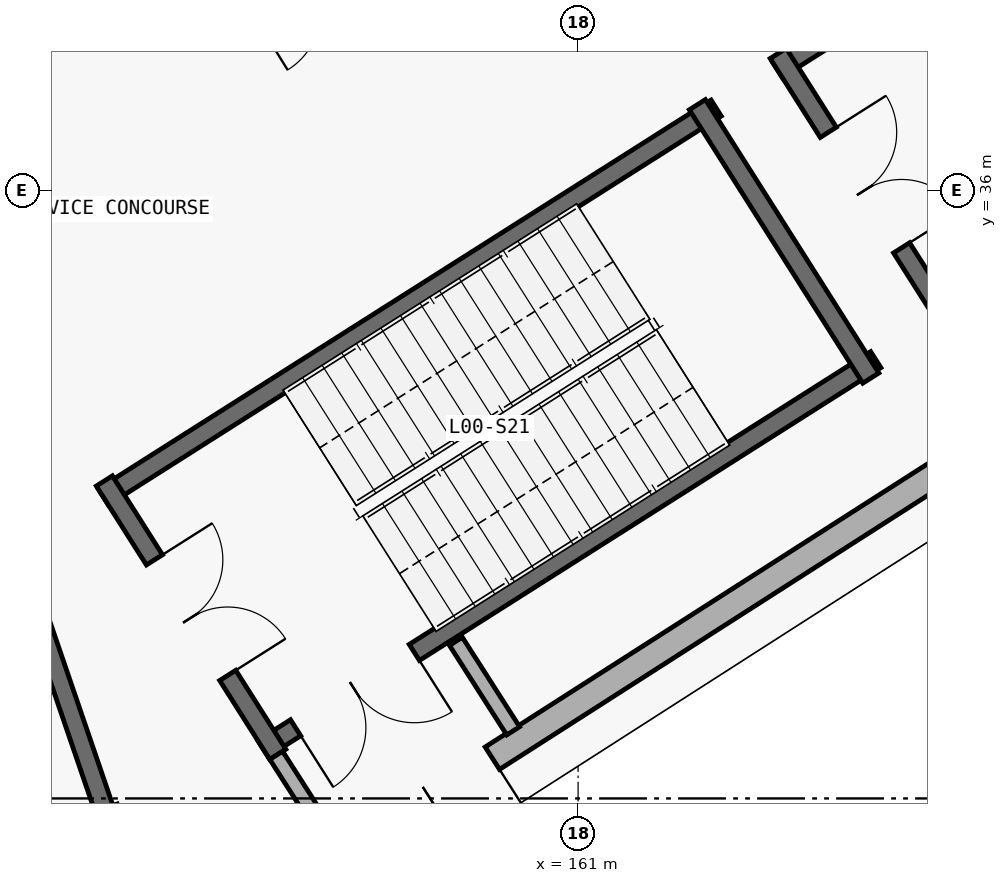
"""IFC4 building model, lengths in metres.
Left out: names, types, materials, properties, quantities, classifications, styles, units other than length and angle.
Written with IfcOpenShell. Run it as: python <this file> out.ifc"""

import sys

from ifc_helpers import new_model, si_unit, direction, frame, frame_2d, origin, place, context, subcontext, project, spatial, rectangle, extrude, element, fill, save


model = new_model("IFC4")
c1 = context("Model", 3, precision=1e-05, world=origin(), true_north=direction((0.0, 1.0)))
c2 = subcontext(c1, "Body", "Model", "MODEL_VIEW")
j1 = project(units=[si_unit("LENGTHUNIT", "METRE"), si_unit("PLANEANGLEUNIT", "RADIAN")], contexts=[c1])
p1 = place(None, origin())
s1 = spatial("IfcSite", under=j1, at=p1, CompositionType="ELEMENT")
p2 = place(p1, origin())
s2 = spatial("IfcBuilding", under=s1, at=p2, CompositionType="ELEMENT")
p3 = place(p2, origin())
s3 = spatial("IfcBuildingStorey", under=s2, at=p3, CompositionType="ELEMENT", Elevation=0.0)
p4 = place(p3, frame((175.399, 38.465, 0.0), z_axis=(0.0, 0.0, 1.0), x_axis=(-0.842308733224, -0.538995359845, 0.0)))
e1 = element("IfcWall", 1, at=p4, inside=s3, PredefinedType="STANDARD", context=c2, shape_type="SweptSolid", body=[
    extrude(rectangle(XDim=21.139, YDim=0.35, at=frame_2d((10.57, 0.0))), origin(), (0.0, 0.0, 1.0), 4.165),
])
p5 = place(p4, frame((18.434, 0.0, 0.0)))
e2 = element("IfcOpeningElement", 2, at=p5, cuts=e1, PredefinedType="OPENING", context=c2, shape_type="SweptSolid", body=[
    extrude(rectangle(XDim=1.95, YDim=2.25, at=frame_2d((0.975, 1.125))), frame((0.0, 0.185, 0.0), z_axis=(0.0, -1.0, 0.0), x_axis=(1.0, 0.0, 0.0)), (0.0, 0.0, 1.0), 0.37),
])
p6 = place(p4, frame((7.935, 0.0, 0.0)))
e3 = element("IfcOpeningElement", 3, at=p6, cuts=e1, PredefinedType="OPENING", context=c2, shape_type="SweptSolid", body=[
    extrude(rectangle(XDim=1.95, YDim=2.25, at=frame_2d((0.975, 1.125))), frame((0.0, 0.185, 0.0), z_axis=(0.0, -1.0, 0.0), x_axis=(1.0, 0.0, 0.0)), (0.0, 0.0, 1.0), 0.37),
])
p7 = place(p4, frame((4.098, 0.0, 0.0)))
e4 = element("IfcOpeningElement", 4, at=p7, cuts=e1, PredefinedType="OPENING", context=c2, shape_type="SweptSolid", body=[
    extrude(rectangle(XDim=1.95, YDim=2.25, at=frame_2d((0.975, 1.125))), frame((0.0, 0.185, 0.0), z_axis=(0.0, -1.0, 0.0), x_axis=(1.0, 0.0, 0.0)), (0.0, 0.0, 1.0), 0.37),
])
p8 = place(p3, frame((164.917, 33.773, 0.0), z_axis=(0.0, 0.0, 1.0), x_axis=(-0.844391246241, -0.535727004427, 0.0)))
e5 = element("IfcWall", 5, at=p8, inside=s3, PredefinedType="SHEAR", context=c2, shape_type="SweptSolid", body=[
    extrude(rectangle(XDim=9.55, YDim=0.25, at=frame_2d((4.775, 0.0))), origin(), (0.0, 0.0, 1.0), 5.1),
])
p9 = place(p8, frame((7.19, 0.0, 0.0)))
e6 = element("IfcOpeningElement", 6, at=p9, cuts=e5, PredefinedType="OPENING", context=c2, shape_type="SweptSolid", body=[
    extrude(rectangle(XDim=1.85, YDim=2.3, at=frame_2d((0.925, 1.15))), frame((0.0, 0.135, 0.0), z_axis=(0.0, -1.0, 0.0), x_axis=(1.0, 0.0, 0.0)), (0.0, 0.0, 1.0), 0.27),
])
p10 = place(p3, frame((162.817, 37.083, 0.0), z_axis=(0.0, 0.0, 1.0), x_axis=(-0.844391246241, -0.535727004427, 0.0)))
e7 = element("IfcWall", 7, at=p10, inside=s3, PredefinedType="SHEAR", context=c2, shape_type="SweptSolid", body=[
    extrude(rectangle(XDim=9.55, YDim=0.25, at=frame_2d((4.775, 0.0))), origin(), (0.0, 0.0, 1.0), 5.1),
])
p11 = place(p3, frame((154.767, 32.177, 0.0), z_axis=(0.0, 0.0, 1.0), x_axis=(0.535684577572, -0.844418162613, 0.0)))
e8 = element("IfcWall", 8, at=p11, inside=s3, PredefinedType="SHEAR", context=c2, shape_type="SweptSolid", body=[
    extrude(rectangle(XDim=4.26, YDim=0.25, at=frame_2d((2.13, 0.0))), origin(), (0.0, 0.0, 1.0), 5.1),
])
p12 = place(p11, frame((1.23, 0.0, 0.0)))
e9 = element("IfcOpeningElement", 9, at=p12, cuts=e8, PredefinedType="OPENING", context=c2, shape_type="SweptSolid", body=[
    extrude(rectangle(XDim=1.8, YDim=2.25, at=frame_2d((0.9, 1.125))), frame((0.0, 0.135, 0.0), z_axis=(0.0, -1.0, 0.0), x_axis=(1.0, 0.0, 0.0)), (0.0, 0.0, 1.0), 0.27),
])
p13 = place(p3, frame((164.852, 33.53, 0.0), z_axis=(0.0, 0.0, 1.0), x_axis=(-0.53572544074, 0.844392238325, 0.0)))
e10 = element("IfcWall", 10, at=p13, inside=s3, PredefinedType="SHEAR", context=c2, shape_type="SweptSolid", body=[
    extrude(rectangle(XDim=4.26, YDim=0.25, at=frame_2d((2.13, 0.0))), origin(), (0.0, 0.0, 1.0), 5.1),
])
p14 = place(p3, frame((154.976, 27.809, 0.0), z_axis=(0.0, 0.0, 1.0), x_axis=(-0.946064424228, -0.323978556712, 0.0)))
e11 = element("IfcWall", 11, at=p14, inside=s3, PredefinedType="SHEAR", context=c2, shape_type="SweptSolid", body=[
    extrude(rectangle(XDim=9.55, YDim=0.25, at=frame_2d((4.775, 0.0))), origin(), (0.0, 0.0, 1.0), 5.1),
])
p15 = place(p14, frame((7.19, 0.0, 0.0)))
e12 = element("IfcOpeningElement", 12, at=p15, cuts=e11, PredefinedType="OPENING", context=c2, shape_type="SweptSolid", body=[
    extrude(rectangle(XDim=1.85, YDim=2.3, at=frame_2d((0.925, 1.15))), frame((0.0, 0.135, 0.0), z_axis=(0.0, -1.0, 0.0), x_axis=(1.0, 0.0, 0.0)), (0.0, 0.0, 1.0), 0.27),
])
p16 = place(p3, frame((154.856, 27.589, 0.0), z_axis=(0.0, 0.0, 1.0), x_axis=(-0.323988758717, 0.946060930504, 0.0)))
e13 = element("IfcWall", 13, at=p16, inside=s3, PredefinedType="SHEAR", context=c2, shape_type="SweptSolid", body=[
    extrude(rectangle(XDim=4.26, YDim=0.25, at=frame_2d((2.13, 0.0))), origin(), (0.0, 0.0, 1.0), 5.1),
])
p17 = place(p3, frame((171.683, 42.708, 0.0), z_axis=(0.0, 0.0, 1.0), x_axis=(-0.844391246241, -0.535727004427, 0.0)))
e14 = element("IfcWall", 14, at=p17, inside=s3, PredefinedType="SHEAR", context=c2, shape_type="SweptSolid", body=[
    extrude(rectangle(XDim=9.55, YDim=0.25, at=frame_2d((4.775, 0.0))), origin(), (0.0, 0.0, 1.0), 5.1),
])
p18 = place(p3, frame((163.633, 37.802, 0.0), z_axis=(0.0, 0.0, 1.0), x_axis=(0.535684577572, -0.844418162613, 0.0)))
e15 = element("IfcWall", 15, at=p18, inside=s3, PredefinedType="SHEAR", context=c2, shape_type="SweptSolid", body=[
    extrude(rectangle(XDim=4.26, YDim=0.25, at=frame_2d((2.13, 0.0))), origin(), (0.0, 0.0, 1.0), 5.1),
])
p19 = place(p18, frame((1.23, 0.0, 0.0)))
e16 = element("IfcOpeningElement", 16, at=p19, cuts=e15, PredefinedType="OPENING", context=c2, shape_type="SweptSolid", body=[
    extrude(rectangle(XDim=1.8, YDim=2.25, at=frame_2d((0.9, 1.125))), frame((0.0, 0.135, 0.0), z_axis=(0.0, -1.0, 0.0), x_axis=(1.0, 0.0, 0.0)), (0.0, 0.0, 1.0), 0.27),
])
p20 = place(p3, frame((157.028, 28.567, 0.0), z_axis=(0.0, 0.0, 1.0), x_axis=(0.539171685924, -0.842195875731, 0.0)))
e17 = element("IfcWall", 17, at=p20, inside=s3, PredefinedType="PARTITIONING", context=c2, shape_type="SweptSolid", body=[
    extrude(rectangle(XDim=1.409, YDim=0.2, at=frame_2d((0.705, 0.0))), origin(), (0.0, 0.0, 1.0), 4.165),
])
p21 = place(p3, frame((159.393, 30.067, 0.0), z_axis=(0.0, 0.0, 1.0), x_axis=(0.538885207577, -0.842379209771, 0.0)))
e18 = element("IfcWall", 18, at=p21, inside=s3, PredefinedType="PARTITIONING", context=c2, shape_type="SweptSolid", body=[
    extrude(rectangle(XDim=1.398, YDim=0.2, at=frame_2d((0.699, 0.0))), origin(), (0.0, 0.0, 1.0), 4.165),
])
p22 = place(p5, origin())
e19 = element("IfcDoor", 19, at=p22, inside=s3, OperationType="DOUBLE_DOOR_SINGLE_SWING", PredefinedType="DOOR", context=c2, shape_type="SweptSolid", body=[
    extrude(rectangle(XDim=1.95, YDim=2.25, at=frame_2d((0.975, 1.125))), frame((0.0, 0.025, 0.0), z_axis=(0.0, -1.0, 0.0), x_axis=(1.0, 0.0, 0.0)), (0.0, 0.0, 1.0), 0.05),
])
fill(e2, e19)
p23 = place(p12, origin())
e20 = element("IfcDoor", 20, at=p23, inside=s3, OperationType="DOUBLE_DOOR_SINGLE_SWING", PredefinedType="DOOR", context=c2, shape_type="SweptSolid", body=[
    extrude(rectangle(XDim=1.8, YDim=2.25, at=frame_2d((0.9, 1.125))), frame((0.0, 0.025, 0.0), z_axis=(0.0, -1.0, 0.0), x_axis=(1.0, 0.0, 0.0)), (0.0, 0.0, 1.0), 0.05),
])
fill(e9, e20)
p24 = place(p9, origin())
e21 = element("IfcDoor", 21, at=p24, inside=s3, OperationType="DOUBLE_DOOR_SINGLE_SWING", PredefinedType="DOOR", context=c2, shape_type="SweptSolid", body=[
    extrude(rectangle(XDim=1.85, YDim=2.3, at=frame_2d((0.925, 1.15))), frame((0.0, 0.025, 0.0), z_axis=(0.0, -1.0, 0.0), x_axis=(1.0, 0.0, 0.0)), (0.0, 0.0, 1.0), 0.05),
])
fill(e6, e21)
p25 = place(p19, origin())
e22 = element("IfcDoor", 22, at=p25, inside=s3, OperationType="DOUBLE_DOOR_SINGLE_SWING", PredefinedType="DOOR", context=c2, shape_type="SweptSolid", body=[
    extrude(rectangle(XDim=1.8, YDim=2.25, at=frame_2d((0.9, 1.125))), frame((0.0, 0.025, 0.0), z_axis=(0.0, -1.0, 0.0), x_axis=(1.0, 0.0, 0.0)), (0.0, 0.0, 1.0), 0.05),
])
fill(e16, e22)
save(model, sys.argv[1])
